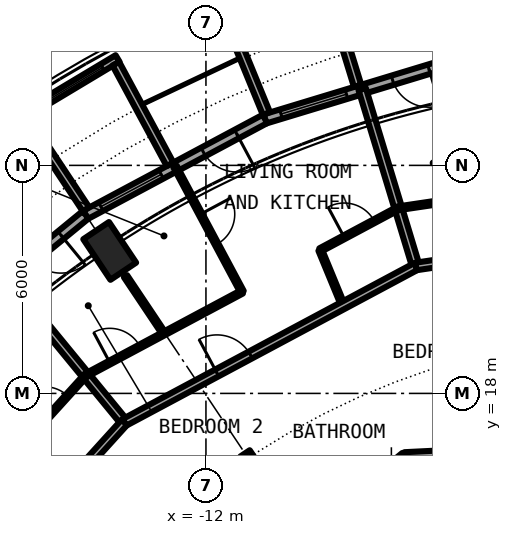
"""IFC4 building model, lengths in metres.
Left out: names, types, materials, properties, quantities, classifications, styles, units other than length and angle.
Written with IfcOpenShell. Run it as: python <this file> out.ifc"""

import sys

from ifc_helpers import new_model, si_unit, direction, frame, frame_2d, origin, origin_2d, place, context, subcontext, project, spatial, rectangle, circle, hollow_circle, i_section, extrude, element, fill, save


model = new_model("IFC4")
c1 = context("Model", 3, precision=1e-05, world=origin(), true_north=direction((0.0, 1.0)))
c2 = subcontext(c1, "Body", "Model", "MODEL_VIEW")
j1 = project(units=[si_unit("LENGTHUNIT", "METRE"), si_unit("PLANEANGLEUNIT", "RADIAN")], contexts=[c1])
p1 = place(None, origin())
s1 = spatial("IfcSite", under=j1, at=p1, CompositionType="ELEMENT")
p2 = place(p1, origin())
s2 = spatial("IfcBuilding", under=s1, at=p2, CompositionType="ELEMENT")
p3 = place(p2, frame((0.0, 0.0, 234.05)))
s3 = spatial("IfcBuildingStorey", under=s2, at=p3, CompositionType="ELEMENT", Elevation=234.05)
p4 = place(p3, frame((-14.889, 22.283, 0.0), z_axis=(0.231777820067, -0.346913947437, 0.908806775502), x_axis=(0.831494710184, 0.555532669549, 0.0)))
e1 = element("IfcColumn", 1, at=p4, inside=s3, PredefinedType="COLUMN", context=c2, shape_type="SweptSolid", body=[
    extrude(hollow_circle(Radius=0.406, WallThickness=0.03, at=origin_2d()), origin(), (0.0, 0.0, 1.0), 3.081),
])
p5 = place(p3, frame((-10.889, 16.297, 0.0), z_axis=(0.0, 0.0, 1.0), x_axis=(-0.55557023302, 0.831469612303, 0.0)))
e2 = element("IfcColumn", 2, at=p5, inside=s3, PredefinedType="COLUMN", context=c2, shape_type="SweptSolid", body=[
    extrude(i_section(OverallWidth=0.3, OverallDepth=0.3, WebThickness=0.011, FlangeThickness=0.019, FilletRadius=0.027, at=origin_2d()), origin(), (0.0, 0.0, 1.0), 3.05),
])
p6 = place(p3, frame((-5.326, 26.775, 0.0), z_axis=(0.0, 0.0, 1.0), x_axis=(-0.956965678721, -0.290201119486, 0.0)))
e3 = element("IfcWall", 3, at=p6, inside=s3, PredefinedType="SOLIDWALL", context=c2, shape_type="SweptSolid", body=[
    extrude(rectangle(XDim=5.351, YDim=0.25, at=frame_2d((2.676, 0.0))), origin(), (0.0, 0.0, 1.0), 2.7),
])
p7 = place(p6, frame((0.841, 0.0, 0.0)))
e4 = element("IfcOpeningElement", 4, at=p7, cuts=e3, PredefinedType="OPENING", context=c2, shape_type="SweptSolid", body=[
    extrude(rectangle(XDim=1.0, YDim=2.2, at=frame_2d((0.5, 1.1))), frame((0.0, 0.135, 0.0), z_axis=(0.0, -1.0, 0.0), x_axis=(1.0, 0.0, 0.0)), (0.0, 0.0, 1.0), 0.27),
])
p8 = place(p6, frame((3.111, 0.0, 0.3)))
e5 = element("IfcOpeningElement", 5, at=p8, cuts=e3, PredefinedType="OPENING", context=c2, shape_type="SweptSolid", body=[
    extrude(rectangle(XDim=1.8, YDim=2.1, at=frame_2d((0.9, 1.05))), frame((0.0, 0.135, 0.0), z_axis=(0.0, -1.0, 0.0), x_axis=(1.0, 0.0, 0.0)), (0.0, 0.0, 1.0), 0.27),
])
p9 = place(p3, frame((-8.009, 26.092, -0.03), z_axis=(0.0, 0.0, 1.0), x_axis=(-0.293406695073, 0.955987715029, 0.0)))
e6 = element("IfcWall", 6, at=p9, inside=s3, PredefinedType="SOLIDWALL", context=c2, shape_type="SweptSolid", body=[
    extrude(rectangle(XDim=3.006, YDim=0.2, at=frame_2d((1.503, 0.0))), origin(), (0.0, 0.0, 1.0), 2.73),
])
p10 = place(p3, frame((-10.409, 25.364, -0.03), z_axis=(0.0, 0.0, 1.0), x_axis=(-0.379509886562, 0.925187681501, 0.0)))
e7 = element("IfcWall", 7, at=p10, inside=s3, PredefinedType="SOLIDWALL", context=c2, shape_type="SweptSolid", body=[
    extrude(rectangle(XDim=2.883, YDim=0.2, at=frame_2d((1.441, 0.0))), origin(), (0.0, 0.0, 1.0), 2.73),
])
p11 = place(p3, frame((-10.447, 25.222, 0.0), z_axis=(0.0, 0.0, 1.0), x_axis=(-0.881915646801, -0.471407246368, 0.0)))
e8 = element("IfcWall", 8, at=p11, inside=s3, PredefinedType="SOLIDWALL", context=c2, shape_type="SweptSolid", body=[
    extrude(rectangle(XDim=5.352, YDim=0.25, at=frame_2d((2.676, 0.0))), origin(), (0.0, 0.0, 1.0), 2.7),
])
p12 = place(p11, frame((0.841, 0.0, 0.0)))
e9 = element("IfcOpeningElement", 9, at=p12, cuts=e8, PredefinedType="OPENING", context=c2, shape_type="SweptSolid", body=[
    extrude(rectangle(XDim=1.0, YDim=2.2, at=frame_2d((0.5, 1.1))), frame((0.0, 0.135, 0.0), z_axis=(0.0, -1.0, 0.0), x_axis=(1.0, 0.0, 0.0)), (0.0, 0.0, 1.0), 0.27),
])
p13 = place(p11, frame((3.096, 0.0, 0.3)))
e10 = element("IfcOpeningElement", 10, at=p13, cuts=e8, PredefinedType="OPENING", context=c2, shape_type="SweptSolid", body=[
    extrude(rectangle(XDim=1.8, YDim=2.1, at=frame_2d((0.9, 1.05))), frame((0.0, 0.135, 0.0), z_axis=(0.0, -1.0, 0.0), x_axis=(1.0, 0.0, 0.0)), (0.0, 0.0, 1.0), 0.27),
])
p14 = place(p3, frame((-14.326, 26.813, -0.03), z_axis=(0.0, 0.0, 1.0), x_axis=(-0.857672799601, -0.51419584676, 0.0)))
e11 = element("IfcWall", 11, at=p14, inside=s3, PredefinedType="SOLIDWALL", context=c2, shape_type="SweptSolid", body=[
    extrude(rectangle(XDim=2.993, YDim=0.2, at=frame_2d((1.497, 0.0))), origin(), (0.0, 0.0, 1.0), 2.73),
])
p15 = place(p14, frame((0.457, 0.0, 0.33)))
e12 = element("IfcOpeningElement", 12, at=p15, cuts=e11, PredefinedType="OPENING", context=c2, shape_type="SweptSolid", body=[
    extrude(circle(Radius=1.04, at=frame_2d((1.04, 1.04))), frame((0.0, 0.11, 0.0), z_axis=(0.0, -1.0, 0.0), x_axis=(1.0, 0.0, 0.0)), (0.0, 0.0, 1.0), 0.22),
])
p16 = place(p3, frame((-12.945, 24.029, -0.03), z_axis=(0.0, 0.0, 1.0), x_axis=(-0.474424310775, 0.88029629861, 0.0)))
e13 = element("IfcWall", 13, at=p16, inside=s3, PredefinedType="SOLIDWALL", context=c2, shape_type="SweptSolid", body=[
    extrude(rectangle(XDim=3.006, YDim=0.2, at=frame_2d((1.503, 0.0))), origin(), (0.0, 0.0, 1.0), 2.73),
])
p17 = place(p3, frame((-15.157, 22.846, -0.03), z_axis=(0.0, 0.0, 1.0), x_axis=(-0.552529231086, 0.833493520548, 0.0)))
e14 = element("IfcWall", 14, at=p17, inside=s3, PredefinedType="SOLIDWALL", context=c2, shape_type="SweptSolid", body=[
    extrude(rectangle(XDim=2.883, YDim=0.2, at=frame_2d((1.441, 0.0))), origin(), (0.0, 0.0, 1.0), 2.73),
])
p18 = place(p3, frame((-15.167, 22.699, 0.0), z_axis=(0.0, 0.0, 1.0), x_axis=(-0.773019449054, -0.634382322723, 0.0)))
e15 = element("IfcWall", 15, at=p18, inside=s3, PredefinedType="SOLIDWALL", context=c2, shape_type="SweptSolid", body=[
    extrude(rectangle(XDim=5.352, YDim=0.25, at=frame_2d((2.676, 0.0))), origin(), (0.0, 0.0, 1.0), 2.7),
])
p19 = place(p18, frame((0.841, 0.0, 0.0)))
e16 = element("IfcOpeningElement", 16, at=p19, cuts=e15, PredefinedType="OPENING", context=c2, shape_type="SweptSolid", body=[
    extrude(rectangle(XDim=1.0, YDim=2.2, at=frame_2d((0.5, 1.1))), frame((0.0, 0.135, 0.0), z_axis=(0.0, -1.0, 0.0), x_axis=(1.0, 0.0, 0.0)), (0.0, 0.0, 1.0), 0.27),
])
p20 = place(p18, frame((3.111, 0.0, 0.3)))
e17 = element("IfcOpeningElement", 17, at=p20, cuts=e15, PredefinedType="OPENING", context=c2, shape_type="SweptSolid", body=[
    extrude(rectangle(XDim=1.8, YDim=2.1, at=frame_2d((0.9, 1.05))), frame((0.0, 0.135, 0.0), z_axis=(0.0, -1.0, 0.0), x_axis=(1.0, 0.0, 0.0)), (0.0, 0.0, 1.0), 0.27),
])
p21 = place(p3, frame((-17.24, 21.007, 0.0), z_axis=(0.0, 0.0, 1.0), x_axis=(0.634374159378, -0.773026148273, 0.0)))
e18 = element("IfcWall", 18, at=p21, inside=s3, PredefinedType="PARTITIONING", context=c2, shape_type="SweptSolid", body=[
    extrude(rectangle(XDim=4.876, YDim=0.2, at=frame_2d((2.438, 0.0))), origin(), (0.0, 0.0, 1.0), 2.7),
])
p22 = place(p3, frame((-16.732, 16.743, 0.0), z_axis=(0.0, 0.0, 1.0), x_axis=(0.70679853939, -0.707414888673, 0.0)))
e19 = element("IfcWall", 19, at=p22, inside=s3, PredefinedType="PARTITIONING", context=c2, shape_type="SweptSolid", body=[
    extrude(rectangle(XDim=1.584, YDim=0.1, at=frame_2d((0.792, 0.0))), origin(), (0.0, 0.0, 1.0), 2.7),
])
p23 = place(p3, frame((-14.117, 21.084, 0.0), z_axis=(0.0, 0.0, 1.0), x_axis=(0.556342315305, -0.830953204579, 0.0)))
e20 = element("IfcWall", 20, at=p23, inside=s3, PredefinedType="PARTITIONING", context=c2, shape_type="SweptSolid", body=[
    extrude(rectangle(XDim=1.817, YDim=0.1, at=frame_2d((0.909, 0.0))), origin(), (0.0, 0.0, 1.0), 2.7),
])
p24 = place(p3, frame((-12.81, 23.966, 0.0), z_axis=(0.0, 0.0, 1.0), x_axis=(0.471372010014, -0.881934480659, 0.0)))
e21 = element("IfcWall", 21, at=p24, inside=s3, PredefinedType="PARTITIONING", context=c2, shape_type="SweptSolid", body=[
    extrude(rectangle(XDim=3.734, YDim=0.1, at=frame_2d((1.867, 0.0))), origin(), (0.0, 0.0, 1.0), 2.7),
])
p25 = place(p24, frame((1.417, 0.0, 0.0)))
e22 = element("IfcOpeningElement", 22, at=p25, cuts=e21, PredefinedType="OPENING", context=c2, shape_type="SweptSolid", body=[
    extrude(rectangle(XDim=0.9, YDim=2.3, at=frame_2d((0.45, 1.15))), frame((0.0, 0.06, 0.0), z_axis=(0.0, -1.0, 0.0), x_axis=(1.0, 0.0, 0.0)), (0.0, 0.0, 1.0), 0.12),
])
p26 = place(p3, frame((-8.994, 21.772, 0.0), z_axis=(0.0, 0.0, 1.0), x_axis=(0.381535938362, -0.924354005638, 0.0)))
e23 = element("IfcWall", 23, at=p26, inside=s3, PredefinedType="PARTITIONING", context=c2, shape_type="SweptSolid", body=[
    extrude(rectangle(XDim=1.577, YDim=0.1, at=frame_2d((0.789, 0.0))), origin(), (0.0, 0.0, 1.0), 2.7),
])
p27 = place(p3, frame((-7.888, 26.005, 0.0), z_axis=(0.0, 0.0, 1.0), x_axis=(0.290053269332, -0.957010502006, 0.0)))
e24 = element("IfcWall", 24, at=p27, inside=s3, PredefinedType="PARTITIONING", context=c2, shape_type="SweptSolid", body=[
    extrude(rectangle(XDim=4.874, YDim=0.2, at=frame_2d((2.437, 0.0))), origin(), (0.0, 0.0, 1.0), 2.7),
])
p28 = place(p3, frame((-6.773, 16.353, 0.0), z_axis=(0.0, 0.0, 1.0), x_axis=(0.382549125466, -0.923935152814, 0.0)))
e25 = element("IfcWall", 25, at=p28, inside=s3, PredefinedType="PARTITIONING", context=c2, shape_type="SweptSolid", body=[
    extrude(rectangle(XDim=9.98, YDim=0.2, at=frame_2d((4.99, 0.0))), origin(), (0.0, 0.0, 1.0), 2.7),
])
p29 = place(p3, frame((-6.774, 16.353, 0.0), z_axis=(0.0, 0.0, 1.0), x_axis=(0.998797244, 0.049031269395, 0.0)))
e26 = element("IfcWall", 26, at=p29, inside=s3, PredefinedType="PARTITIONING", context=c2, shape_type="SweptSolid", body=[
    extrude(rectangle(XDim=11.93, YDim=0.2, at=frame_2d((5.965, 0.0))), origin(), (0.0, 0.0, 1.0), 2.7),
])
p30 = place(p29, frame((4.611, 0.0, 0.0)))
e27 = element("IfcOpeningElement", 27, at=p30, cuts=e26, PredefinedType="OPENING", context=c2, shape_type="SweptSolid", body=[
    extrude(rectangle(XDim=1.0, YDim=2.3, at=frame_2d((0.5, 1.15))), frame((0.0, 0.11, 0.0), z_axis=(0.0, -1.0, 0.0), x_axis=(1.0, 0.0, 0.0)), (0.0, 0.0, 1.0), 0.22),
])
p31 = place(p3, frame((-14.717, 9.834, 0.0), z_axis=(0.0, 0.0, 1.0), x_axis=(0.773034536097, 0.634363938131, 0.0)))
e28 = element("IfcWall", 28, at=p31, inside=s3, PredefinedType="PARTITIONING", context=c2, shape_type="SweptSolid", body=[
    extrude(rectangle(XDim=10.277, YDim=0.2, at=frame_2d((5.138, 0.0))), origin(), (0.0, 0.0, 1.0), 2.7),
])
p32 = place(p31, frame((4.638, 0.0, 0.0)))
e29 = element("IfcOpeningElement", 29, at=p32, cuts=e28, PredefinedType="OPENING", context=c2, shape_type="SweptSolid", body=[
    extrude(rectangle(XDim=1.0, YDim=2.3, at=frame_2d((0.5, 1.15))), frame((0.0, 0.11, 0.0), z_axis=(0.0, -1.0, 0.0), x_axis=(1.0, 0.0, 0.0)), (0.0, 0.0, 1.0), 0.22),
])
p33 = place(p3, frame((-14.149, 17.236, 0.0), z_axis=(0.0, 0.0, 1.0), x_axis=(0.881869539497, 0.471493494448, 0.0)))
e30 = element("IfcWall", 30, at=p33, inside=s3, PredefinedType="PARTITIONING", context=c2, shape_type="SweptSolid", body=[
    extrude(rectangle(XDim=8.704, YDim=0.2, at=frame_2d((4.352, 0.0))), origin(), (0.0, 0.0, 1.0), 2.7),
])
p34 = place(p33, frame((2.765, 0.0, 0.0)))
e31 = element("IfcOpeningElement", 31, at=p34, cuts=e30, PredefinedType="OPENING", context=c2, shape_type="SweptSolid", body=[
    extrude(rectangle(XDim=1.0, YDim=2.3, at=frame_2d((0.5, 1.15))), frame((0.0, 0.11, 0.0), z_axis=(0.0, -1.0, 0.0), x_axis=(1.0, 0.0, 0.0)), (0.0, 0.0, 1.0), 0.22),
])
p35 = place(p3, frame((-18.542, 12.389, 0.0), z_axis=(0.0, 0.0, 1.0), x_axis=(0.671561669125, 0.740948665268, 0.0)))
e32 = element("IfcWall", 32, at=p35, inside=s3, PredefinedType="PARTITIONING", context=c2, shape_type="SweptSolid", body=[
    extrude(rectangle(XDim=6.544, YDim=0.2, at=frame_2d((3.272, 0.0))), origin(), (0.0, 0.0, 1.0), 2.7),
])
p36 = place(p35, frame((1.682, 0.0, 0.0)))
e33 = element("IfcOpeningElement", 33, at=p36, cuts=e32, PredefinedType="OPENING", context=c2, shape_type="SweptSolid", body=[
    extrude(rectangle(XDim=1.0, YDim=2.3, at=frame_2d((0.5, 1.15))), frame((0.0, 0.11, 0.0), z_axis=(0.0, -1.0, 0.0), x_axis=(1.0, 0.0, 0.0)), (0.0, 0.0, 1.0), 0.22),
])
p37 = place(p3, frame((-6.473, 21.34, 0.0), z_axis=(0.0, 0.0, 1.0), x_axis=(0.989181015112, 0.146700100005, 0.0)))
e34 = element("IfcWall", 34, at=p37, inside=s3, PredefinedType="PARTITIONING", context=c2, shape_type="SweptSolid", body=[
    extrude(rectangle(XDim=6.544, YDim=0.2, at=frame_2d((3.272, 0.0))), origin(), (0.0, 0.0, 1.0), 2.7),
])
p38 = place(p37, frame((1.681, 0.0, 0.0)))
e35 = element("IfcOpeningElement", 35, at=p38, cuts=e34, PredefinedType="OPENING", context=c2, shape_type="SweptSolid", body=[
    extrude(rectangle(XDim=1.0, YDim=2.3, at=frame_2d((0.5, 1.15))), frame((0.0, 0.11, 0.0), z_axis=(0.0, -1.0, 0.0), x_axis=(1.0, 0.0, 0.0)), (0.0, 0.0, 1.0), 0.22),
])
p39 = place(p3, frame((-15.162, 18.475, 0.0), z_axis=(0.0, 0.0, 1.0), x_axis=(0.881916280728, 0.471406060405, 0.0)))
e36 = element("IfcWall", 36, at=p39, inside=s3, PredefinedType="PARTITIONING", context=c2, shape_type="SweptSolid", body=[
    extrude(rectangle(XDim=4.663, YDim=0.1, at=frame_2d((2.331, 0.0))), origin(), (0.0, 0.0, 1.0), 2.7),
])
p40 = place(p39, frame((0.716, 0.0, 0.0)))
e37 = element("IfcOpeningElement", 37, at=p40, cuts=e36, PredefinedType="OPENING", context=c2, shape_type="SweptSolid", body=[
    extrude(rectangle(XDim=0.9, YDim=2.3, at=frame_2d((0.45, 1.15))), frame((0.0, 0.06, 0.0), z_axis=(0.0, -1.0, 0.0), x_axis=(1.0, 0.0, 0.0)), (0.0, 0.0, 1.0), 0.12),
])
p41 = place(p3, frame((-8.994, 21.772, 0.0), z_axis=(0.0, 0.0, 1.0), x_axis=(0.881882873346, 0.471468554305, 0.0)))
e38 = element("IfcWall", 38, at=p41, inside=s3, PredefinedType="PARTITIONING", context=c2, shape_type="SweptSolid", body=[
    extrude(rectangle(XDim=2.331, YDim=0.1, at=frame_2d((1.166, 0.0))), origin(), (0.0, 0.0, 1.0), 2.7),
])
p42 = place(p41, frame((0.716, 0.0, 0.0)))
e39 = element("IfcOpeningElement", 39, at=p42, cuts=e38, PredefinedType="OPENING", context=c2, shape_type="SweptSolid", body=[
    extrude(rectangle(XDim=0.9, YDim=2.3, at=frame_2d((0.45, 1.15))), frame((0.0, 0.06, 0.0), z_axis=(0.0, -1.0, 0.0), x_axis=(1.0, 0.0, 0.0)), (0.0, 0.0, 1.0), 0.12),
])
p43 = place(p3, frame((-16.732, 16.743, 0.0), z_axis=(0.0, 0.0, 1.0), x_axis=(0.671528384412, 0.740978831634, 0.0)))
e40 = element("IfcWall", 40, at=p43, inside=s3, PredefinedType="PARTITIONING", context=c2, shape_type="SweptSolid", body=[
    extrude(rectangle(XDim=2.338, YDim=0.1, at=frame_2d((1.169, 0.0))), origin(), (0.0, 0.0, 1.0), 2.7),
])
p44 = place(p43, frame((0.719, 0.0, 0.0)))
e41 = element("IfcOpeningElement", 41, at=p44, cuts=e40, PredefinedType="OPENING", context=c2, shape_type="SweptSolid", body=[
    extrude(rectangle(XDim=0.9, YDim=2.3, at=frame_2d((0.45, 1.15))), frame((0.0, 0.06, 0.0), z_axis=(0.0, -1.0, 0.0), x_axis=(1.0, 0.0, 0.0)), (0.0, 0.0, 1.0), 0.12),
])
p45 = place(p3, frame((-6.938, 22.871, 0.0), z_axis=(0.0, 0.0, 1.0), x_axis=(0.989181588285, 0.146696235121, 0.0)))
e42 = element("IfcWall", 42, at=p45, inside=s3, PredefinedType="PARTITIONING", context=c2, shape_type="SweptSolid", body=[
    extrude(rectangle(XDim=2.338, YDim=0.1, at=frame_2d((1.169, 0.0))), origin(), (0.0, 0.0, 1.0), 2.7),
])
p46 = place(p7, origin())
e43 = element("IfcDoor", 43, at=p46, inside=s3, OperationType="SINGLE_SWING_LEFT", PredefinedType="DOOR", context=c2, shape_type="SweptSolid", body=[
    extrude(rectangle(XDim=1.0, YDim=2.2, at=frame_2d((0.5, 1.1))), frame((0.0, 0.025, 0.0), z_axis=(0.0, -1.0, 0.0), x_axis=(1.0, 0.0, 0.0)), (0.0, 0.0, 1.0), 0.05),
])
fill(e4, e43)
p47 = place(p8, origin())
e44 = element("IfcWindow", 44, at=p47, inside=s3, PartitioningType="SINGLE_PANEL", PredefinedType="WINDOW", context=c2, shape_type="SweptSolid", body=[
    extrude(rectangle(XDim=1.8, YDim=2.1, at=frame_2d((0.9, 1.05))), frame((0.0, 0.03, 0.0), z_axis=(0.0, -1.0, 0.0), x_axis=(1.0, 0.0, 0.0)), (0.0, 0.0, 1.0), 0.06),
])
fill(e5, e44)
p48 = place(p12, origin())
e45 = element("IfcDoor", 45, at=p48, inside=s3, OperationType="SINGLE_SWING_LEFT", PredefinedType="DOOR", context=c2, shape_type="SweptSolid", body=[
    extrude(rectangle(XDim=1.0, YDim=2.2, at=frame_2d((0.5, 1.1))), frame((0.0, 0.025, 0.0), z_axis=(0.0, -1.0, 0.0), x_axis=(1.0, 0.0, 0.0)), (0.0, 0.0, 1.0), 0.05),
])
fill(e9, e45)
p49 = place(p13, origin())
e46 = element("IfcWindow", 46, at=p49, inside=s3, PartitioningType="SINGLE_PANEL", PredefinedType="WINDOW", context=c2, shape_type="SweptSolid", body=[
    extrude(rectangle(XDim=1.8, YDim=2.1, at=frame_2d((0.9, 1.05))), frame((0.0, 0.03, 0.0), z_axis=(0.0, -1.0, 0.0), x_axis=(1.0, 0.0, 0.0)), (0.0, 0.0, 1.0), 0.06),
])
fill(e10, e46)
p50 = place(p15, origin())
e47 = element("IfcWindow", 47, at=p50, inside=s3, PartitioningType="SINGLE_PANEL", PredefinedType="WINDOW", context=c2, shape_type="SweptSolid", body=[
    extrude(circle(Radius=1.04, at=frame_2d((1.04, 1.04))), frame((0.0, 0.03, 0.0), z_axis=(0.0, -1.0, 0.0), x_axis=(1.0, 0.0, 0.0)), (0.0, 0.0, 1.0), 0.06),
])
fill(e12, e47)
p51 = place(p19, origin())
e48 = element("IfcDoor", 48, at=p51, inside=s3, OperationType="SINGLE_SWING_LEFT", PredefinedType="DOOR", context=c2, shape_type="SweptSolid", body=[
    extrude(rectangle(XDim=1.0, YDim=2.2, at=frame_2d((0.5, 1.1))), frame((0.0, 0.025, 0.0), z_axis=(0.0, -1.0, 0.0), x_axis=(1.0, 0.0, 0.0)), (0.0, 0.0, 1.0), 0.05),
])
fill(e16, e48)
p52 = place(p34, origin())
e49 = element("IfcDoor", 49, at=p52, inside=s3, OperationType="SINGLE_SWING_LEFT", PredefinedType="DOOR", context=c2, shape_type="SweptSolid", body=[
    extrude(rectangle(XDim=1.0, YDim=2.3, at=frame_2d((0.5, 1.15))), frame((0.0, 0.025, 0.0), z_axis=(0.0, -1.0, 0.0), x_axis=(1.0, 0.0, 0.0)), (0.0, 0.0, 1.0), 0.05),
])
fill(e31, e49)
p53 = place(p42, origin())
e50 = element("IfcDoor", 50, at=p53, inside=s3, OperationType="SINGLE_SWING_LEFT", PredefinedType="DOOR", context=c2, shape_type="SweptSolid", body=[
    extrude(rectangle(XDim=0.9, YDim=2.3, at=frame_2d((0.45, 1.15))), frame((0.0, 0.025, 0.0), z_axis=(0.0, -1.0, 0.0), x_axis=(1.0, 0.0, 0.0)), (0.0, 0.0, 1.0), 0.05),
])
fill(e39, e50)
p54 = place(p25, origin())
e51 = element("IfcDoor", 51, at=p54, inside=s3, OperationType="SINGLE_SWING_RIGHT", PredefinedType="DOOR", context=c2, shape_type="SweptSolid", body=[
    extrude(rectangle(XDim=0.9, YDim=2.3, at=frame_2d((0.45, 1.15))), frame((0.0, 0.025, 0.0), z_axis=(0.0, -1.0, 0.0), x_axis=(1.0, 0.0, 0.0)), (0.0, 0.0, 1.0), 0.05),
])
fill(e22, e51)
p55 = place(p40, origin())
e52 = element("IfcDoor", 52, at=p55, inside=s3, OperationType="SINGLE_SWING_LEFT", PredefinedType="DOOR", context=c2, shape_type="SweptSolid", body=[
    extrude(rectangle(XDim=0.9, YDim=2.3, at=frame_2d((0.45, 1.15))), frame((0.0, 0.025, 0.0), z_axis=(0.0, -1.0, 0.0), x_axis=(1.0, 0.0, 0.0)), (0.0, 0.0, 1.0), 0.05),
])
fill(e37, e52)
p56 = place(p44, origin())
e53 = element("IfcDoor", 53, at=p56, inside=s3, OperationType="SINGLE_SWING_LEFT", PredefinedType="DOOR", context=c2, shape_type="SweptSolid", body=[
    extrude(rectangle(XDim=0.9, YDim=2.3, at=frame_2d((0.45, 1.15))), frame((0.0, 0.025, 0.0), z_axis=(0.0, -1.0, 0.0), x_axis=(1.0, 0.0, 0.0)), (0.0, 0.0, 1.0), 0.05),
])
fill(e41, e53)
save(model, sys.argv[1])
